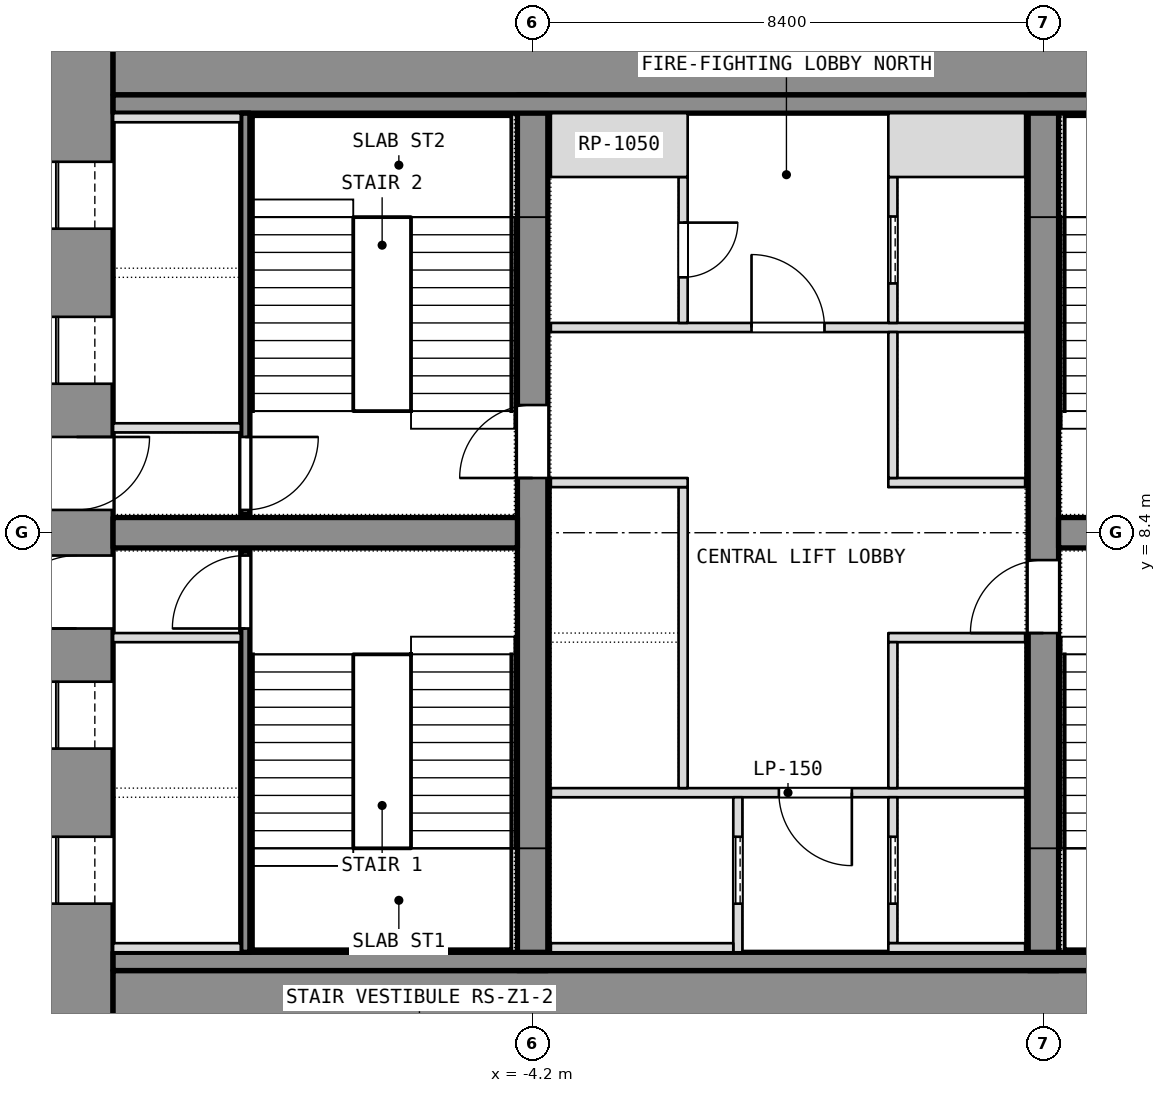
"""IFC4 building model, lengths in metres.
Left out: names, types, materials, properties, quantities, classifications, styles, units other than length and angle.
Written with IfcOpenShell. Run it as: python <this file> out.ifc"""

import sys

from ifc_helpers import new_model, si_unit, direction, frame, frame_2d, origin, place, context, subcontext, project, spatial, rectangle, extrude, element, fill, save


model = new_model("IFC4")
c1 = context("Model", 3, precision=1e-05, world=origin(), true_north=direction((0.0, 1.0)))
c2 = subcontext(c1, "Body", "Model", "MODEL_VIEW")
j1 = project(units=[si_unit("LENGTHUNIT", "METRE"), si_unit("PLANEANGLEUNIT", "RADIAN")], contexts=[c1])
p1 = place(None, origin())
s1 = spatial("IfcSite", under=j1, at=p1, CompositionType="ELEMENT")
p2 = place(p1, origin())
s2 = spatial("IfcBuilding", under=s1, at=p2, CompositionType="ELEMENT")
p3 = place(p2, frame((0.0, 0.0, 50.9)))
s3 = spatial("IfcBuildingStorey", under=s2, at=p3, CompositionType="ELEMENT", Elevation=50.9)
p4 = place(p3, frame((-11.7, 0.0, 0.0), z_axis=(0.0, 0.0, 1.0), x_axis=(0.0, 1.0, 0.0)))
e1 = element("IfcWall", 1, at=p4, inside=s3, PredefinedType="SHEAR", context=c2, shape_type="SweptSolid", body=[
    extrude(rectangle(XDim=16.8, YDim=1.2, at=frame_2d((8.4, 0.0))), origin(), (0.0, 0.0, 1.0), 3.6),
])
p5 = place(p4, frame((2.3, 0.0, 0.0)))
e2 = element("IfcOpeningElement", 2, at=p5, cuts=e1, PredefinedType="OPENING", context=c2, shape_type="SweptSolid", body=[
    extrude(rectangle(XDim=1.1, YDim=2.1, at=frame_2d((0.55, 1.05))), frame((0.0, 0.6, 0.0), z_axis=(0.0, -1.0, 0.0), x_axis=(1.0, 0.0, 0.0)), (0.0, 0.0, 1.0), 1.2),
])
p6 = place(p4, frame((4.85, 0.0, 0.0)))
e3 = element("IfcOpeningElement", 3, at=p6, cuts=e1, PredefinedType="OPENING", context=c2, shape_type="SweptSolid", body=[
    extrude(rectangle(XDim=1.1, YDim=2.1, at=frame_2d((0.55, 1.05))), frame((0.0, 0.6, 0.0), z_axis=(0.0, -1.0, 0.0), x_axis=(1.0, 0.0, 0.0)), (0.0, 0.0, 1.0), 1.2),
])
p7 = place(p4, frame((6.825, 0.0, 0.0)))
e4 = element("IfcOpeningElement", 4, at=p7, cuts=e1, PredefinedType="OPENING", context=c2, shape_type="SweptSolid", body=[
    extrude(rectangle(XDim=1.2, YDim=2.1, at=frame_2d((0.6, 1.05))), frame((0.0, 0.6, 0.0), z_axis=(0.0, -1.0, 0.0), x_axis=(1.0, 0.0, 0.0)), (0.0, 0.0, 1.0), 1.2),
])
p8 = place(p4, frame((13.4, 0.0, 0.0)))
e5 = element("IfcOpeningElement", 5, at=p8, cuts=e1, PredefinedType="OPENING", context=c2, shape_type="SweptSolid", body=[
    extrude(rectangle(XDim=1.1, YDim=2.1, at=frame_2d((0.55, 1.05))), frame((0.0, 0.6, 0.0), z_axis=(0.0, -1.0, 0.0), x_axis=(1.0, 0.0, 0.0)), (0.0, 0.0, 1.0), 1.2),
])
p9 = place(p4, frame((10.85, 0.0, 0.0)))
e6 = element("IfcOpeningElement", 6, at=p9, cuts=e1, PredefinedType="OPENING", context=c2, shape_type="SweptSolid", body=[
    extrude(rectangle(XDim=1.1, YDim=2.1, at=frame_2d((0.55, 1.05))), frame((0.0, 0.6, 0.0), z_axis=(0.0, -1.0, 0.0), x_axis=(1.0, 0.0, 0.0)), (0.0, 0.0, 1.0), 1.2),
])
p10 = place(p4, frame((8.775, 0.0, 0.0)))
e7 = element("IfcOpeningElement", 7, at=p10, cuts=e1, PredefinedType="OPENING", context=c2, shape_type="SweptSolid", body=[
    extrude(rectangle(XDim=1.2, YDim=2.1, at=frame_2d((0.6, 1.05))), frame((0.0, 0.6, 0.0), z_axis=(0.0, -1.0, 0.0), x_axis=(1.0, 0.0, 0.0)), (0.0, 0.0, 1.0), 1.2),
])
for number, where, z_axis, x_axis in (
    (8, (-11.1, 0.6, 0.0), (0.0, 0.0, 1.0), (1.0, 0.0, 0.0)),
    (9, (-11.1, 16.2, 0.0), (0.0, 0.0, 1.0), (1.0, 0.0, 0.0)),
):
    element("IfcWall", number, at=place(p3, frame(where, z_axis=z_axis, x_axis=x_axis)), inside=s3, PredefinedType="SHEAR", context=c2, shape_type="SweptSolid", body=[
        extrude(rectangle(XDim=22.2, YDim=1.2, at=frame_2d((11.1, 0.0))), origin(), (0.0, 0.0, 1.0), 3.6),
    ])
p11 = place(p3, frame((-4.2, 1.2, 0.0), z_axis=(0.0, 0.0, 1.0), x_axis=(0.0, 1.0, 0.0)))
e10 = element("IfcWall", 10, at=p11, inside=s3, PredefinedType="SHEAR", context=c2, shape_type="SweptSolid", body=[
    extrude(rectangle(XDim=14.4, YDim=0.5, at=frame_2d((7.2, 0.0))), origin(), (0.0, 0.0, 1.0), 3.6),
])
p12 = place(p11, frame((8.1, 0.0, 0.0)))
e11 = element("IfcOpeningElement", 11, at=p12, cuts=e10, PredefinedType="OPENING", context=c2, shape_type="SweptSolid", body=[
    extrude(rectangle(XDim=1.2, YDim=2.1, at=frame_2d((0.6, 1.05))), frame((0.0, 0.25, 0.0), z_axis=(0.0, -1.0, 0.0), x_axis=(1.0, 0.0, 0.0)), (0.0, 0.0, 1.0), 0.5),
])
p13 = place(p3, frame((4.2, 1.2, 0.0), z_axis=(0.0, 0.0, 1.0), x_axis=(0.0, 1.0, 0.0)))
e12 = element("IfcWall", 12, at=p13, inside=s3, PredefinedType="SHEAR", context=c2, shape_type="SweptSolid", body=[
    extrude(rectangle(XDim=14.4, YDim=0.5, at=frame_2d((7.2, 0.0))), origin(), (0.0, 0.0, 1.0), 3.6),
])
p14 = place(p13, frame((5.55, 0.0, 0.0)))
e13 = element("IfcOpeningElement", 13, at=p14, cuts=e12, PredefinedType="OPENING", context=c2, shape_type="SweptSolid", body=[
    extrude(rectangle(XDim=1.2, YDim=2.1, at=frame_2d((0.6, 1.05))), frame((0.0, 0.25, 0.0), z_axis=(0.0, -1.0, 0.0), x_axis=(1.0, 0.0, 0.0)), (0.0, 0.0, 1.0), 0.5),
])
for number, where, z_axis, x_axis in (
    (14, (-11.1, 8.4, 0.0), (0.0, 0.0, 1.0), (1.0, 0.0, 0.0)),
    (15, (4.45, 8.4, 0.0), (0.0, 0.0, 1.0), (1.0, 0.0, 0.0)),
):
    element("IfcWall", number, at=place(p3, frame(where, z_axis=z_axis, x_axis=x_axis)), inside=s3, PredefinedType="SHEAR", context=c2, shape_type="SweptSolid", body=[
        extrude(rectangle(XDim=6.65, YDim=0.5, at=frame_2d((3.325, 0.0))), origin(), (0.0, 0.0, 1.0), 3.6),
    ])
for number, where, z_axis, x_axis in (
    (16, (-11.1, 1.35, 0.0), (0.0, 0.0, 1.0), (1.0, 0.0, 0.0)),
    (17, (-11.1, 15.45, 0.0), (0.0, 0.0, 1.0), (1.0, 0.0, 0.0)),
):
    element("IfcWall", number, at=place(p3, frame(where, z_axis=z_axis, x_axis=x_axis)), inside=s3, PredefinedType="PARTITIONING", context=c2, shape_type="SweptSolid", body=[
        extrude(rectangle(XDim=22.2, YDim=0.3, at=frame_2d((11.1, 0.0))), origin(), (0.0, 0.0, 1.0), 3.34),
    ])
p15 = place(p3, frame((-8.925, 1.5, 0.0), z_axis=(0.0, 0.0, 1.0), x_axis=(0.0, 1.0, 0.0)))
e18 = element("IfcWall", 18, at=p15, inside=s3, PredefinedType="SHEAR", context=c2, shape_type="SweptSolid", body=[
    extrude(rectangle(XDim=6.6, YDim=0.15, at=frame_2d((3.3, 0.0))), origin(), (0.0, 0.0, 1.0), 3.34),
])
p16 = place(p15, frame((5.325, 0.0, 0.0)))
e19 = element("IfcOpeningElement", 19, at=p16, cuts=e18, PredefinedType="OPENING", context=c2, shape_type="SweptSolid", body=[
    extrude(rectangle(XDim=1.2, YDim=2.1, at=frame_2d((0.6, 1.05))), frame((0.0, 0.075, 0.0), z_axis=(0.0, -1.0, 0.0), x_axis=(1.0, 0.0, 0.0)), (0.0, 0.0, 1.0), 0.15),
])
for number, where, z_axis, x_axis in (
    (20, (-11.1, 6.675, 0.0), (0.0, 0.0, 1.0), (1.0, 0.0, 0.0)),
    (21, (-11.1, 1.575, 0.0), (0.0, 0.0, 1.0), (1.0, 0.0, 0.0)),
):
    element("IfcWall", number, at=place(p3, frame(where, z_axis=z_axis, x_axis=x_axis)), inside=s3, PredefinedType="SHEAR", context=c2, shape_type="SweptSolid", body=[
        extrude(rectangle(XDim=2.1, YDim=0.15, at=frame_2d((1.05, 0.0))), origin(), (0.0, 0.0, 1.0), 3.6),
    ])
p17 = place(p3, frame((-8.925, 8.7, 0.0), z_axis=(0.0, 0.0, 1.0), x_axis=(0.0, 1.0, 0.0)))
e22 = element("IfcWall", 22, at=p17, inside=s3, PredefinedType="SHEAR", context=c2, shape_type="SweptSolid", body=[
    extrude(rectangle(XDim=6.6, YDim=0.15, at=frame_2d((3.3, 0.0))), origin(), (0.0, 0.0, 1.0), 3.34),
])
p18 = place(p17, frame((0.075, 0.0, 0.0)))
e23 = element("IfcOpeningElement", 23, at=p18, cuts=e22, PredefinedType="OPENING", context=c2, shape_type="SweptSolid", body=[
    extrude(rectangle(XDim=1.2, YDim=2.1, at=frame_2d((0.6, 1.05))), frame((0.0, 0.075, 0.0), z_axis=(0.0, -1.0, 0.0), x_axis=(1.0, 0.0, 0.0)), (0.0, 0.0, 1.0), 0.15),
])
for number, where, z_axis, x_axis in (
    (24, (-11.1, 10.125, 0.0), (0.0, 0.0, 1.0), (1.0, 0.0, 0.0)),
    (25, (-11.1, 15.225, 0.0), (0.0, 0.0, 1.0), (1.0, 0.0, 0.0)),
):
    element("IfcWall", number, at=place(p3, frame(where, z_axis=z_axis, x_axis=x_axis)), inside=s3, PredefinedType="SHEAR", context=c2, shape_type="SweptSolid", body=[
        extrude(rectangle(XDim=2.1, YDim=0.15, at=frame_2d((1.05, 0.0))), origin(), (0.0, 0.0, 1.0), 3.6),
    ])
p19 = place(p3, frame((-3.9, 4.125, 0.0), z_axis=(0.0, 0.0, 1.0), x_axis=(1.0, 0.0, 0.0)))
e26 = element("IfcWall", 26, at=p19, inside=s3, PredefinedType="PARTITIONING", context=c2, shape_type="SweptSolid", body=[
    extrude(rectangle(XDim=7.8, YDim=0.15, at=frame_2d((3.9, 0.0))), origin(), (0.0, 0.0, 1.0), 3.34),
])
p20 = place(p19, frame((3.75, 0.0, 0.0)))
e27 = element("IfcOpeningElement", 27, at=p20, cuts=e26, PredefinedType="OPENING", context=c2, shape_type="SweptSolid", body=[
    extrude(rectangle(XDim=1.2, YDim=2.1, at=frame_2d((0.6, 1.05))), frame((0.0, 0.075, 0.0), z_axis=(0.0, -1.0, 0.0), x_axis=(1.0, 0.0, 0.0)), (0.0, 0.0, 1.0), 0.15),
])
p21 = place(p3, frame((-3.9, 11.775, 0.0), z_axis=(0.0, 0.0, 1.0), x_axis=(1.0, 0.0, 0.0)))
e28 = element("IfcWall", 28, at=p21, inside=s3, PredefinedType="PARTITIONING", context=c2, shape_type="SweptSolid", body=[
    extrude(rectangle(XDim=7.8, YDim=0.15, at=frame_2d((3.9, 0.0))), origin(), (0.0, 0.0, 1.0), 3.34),
])
p22 = place(p21, frame((3.3, 0.0, 0.0)))
e29 = element("IfcOpeningElement", 29, at=p22, cuts=e28, PredefinedType="OPENING", context=c2, shape_type="SweptSolid", body=[
    extrude(rectangle(XDim=1.2, YDim=2.1, at=frame_2d((0.6, 1.05))), frame((0.0, 0.075, 0.0), z_axis=(0.0, -1.0, 0.0), x_axis=(1.0, 0.0, 0.0)), (0.0, 0.0, 1.0), 0.15),
])
p23 = place(p3, frame((-0.825, 1.5, 0.0), z_axis=(0.0, 0.0, 1.0), x_axis=(0.0, 1.0, 0.0)))
e30 = element("IfcWall", 30, at=p23, inside=s3, PredefinedType="SHEAR", context=c2, shape_type="SweptSolid", body=[
    extrude(rectangle(XDim=2.55, YDim=0.15, at=frame_2d((1.275, 0.0))), origin(), (0.0, 0.0, 1.0), 3.6),
])
p24 = place(p23, frame((0.8, 0.0, 0.0)))
e31 = element("IfcOpeningElement", 31, at=p24, cuts=e30, PredefinedType="OPENING", context=c2, shape_type="SweptSolid", body=[
    extrude(rectangle(XDim=1.1, YDim=2.1, at=frame_2d((0.55, 1.05))), frame((0.0, 0.075, 0.0), z_axis=(0.0, -1.0, 0.0), x_axis=(1.0, 0.0, 0.0)), (0.0, 0.0, 1.0), 0.15),
])
p25 = place(p3, frame((-3.9, 1.575, 0.0), z_axis=(0.0, 0.0, 1.0), x_axis=(1.0, 0.0, 0.0)))
e32 = element("IfcWall", 32, at=p25, inside=s3, PredefinedType="SHEAR", context=c2, shape_type="SweptSolid", body=[
    extrude(rectangle(XDim=3.0, YDim=0.15, at=frame_2d((1.5, 0.0))), origin(), (0.0, 0.0, 1.0), 3.6),
])
p26 = place(p3, frame((-1.725, 4.2, 0.0), z_axis=(0.0, 0.0, 1.0), x_axis=(0.0, 1.0, 0.0)))
e33 = element("IfcWall", 33, at=p26, inside=s3, PredefinedType="SHEAR", context=c2, shape_type="SweptSolid", body=[
    extrude(rectangle(XDim=4.95, YDim=0.15, at=frame_2d((2.475, 0.0))), origin(), (0.0, 0.0, 1.0), 3.6),
])
p27 = place(p3, frame((-3.9, 9.225, 0.0), z_axis=(0.0, 0.0, 1.0), x_axis=(1.0, 0.0, 0.0)))
e34 = element("IfcWall", 34, at=p27, inside=s3, PredefinedType="SHEAR", context=c2, shape_type="SweptSolid", body=[
    extrude(rectangle(XDim=2.25, YDim=0.15, at=frame_2d((1.125, 0.0))), origin(), (0.0, 0.0, 1.0), 3.6),
])
p28 = place(p3, frame((-1.725, 11.85, 0.0), z_axis=(0.0, 0.0, 1.0), x_axis=(0.0, 1.0, 0.0)))
e35 = element("IfcWall", 35, at=p28, inside=s3, PredefinedType="PARTITIONING", context=c2, shape_type="SweptSolid", body=[
    extrude(rectangle(XDim=2.4, YDim=0.15, at=frame_2d((1.2, 0.0))), origin(), (0.0, 0.0, 1.0), 3.34),
])
p29 = place(p28, frame((0.75, 0.0, 0.0)))
e36 = element("IfcOpeningElement", 36, at=p29, cuts=e35, PredefinedType="OPENING", context=c2, shape_type="SweptSolid", body=[
    extrude(rectangle(XDim=0.9, YDim=2.1, at=frame_2d((0.45, 1.05))), frame((0.0, 0.075, 0.0), z_axis=(0.0, -1.0, 0.0), x_axis=(1.0, 0.0, 0.0)), (0.0, 0.0, 1.0), 0.15),
])
p30 = place(p3, frame((-3.9, 14.775, 0.0), z_axis=(0.0, 0.0, 1.0), x_axis=(1.0, 0.0, 0.0)))
e37 = element("IfcWall", 37, at=p30, inside=s3, PredefinedType="PARTITIONING", context=c2, shape_type="SweptSolid", body=[
    extrude(rectangle(XDim=2.25, YDim=1.05, at=frame_2d((1.125, 0.0))), origin(), (0.0, 0.0, 1.0), 3.34),
])
p31 = place(p3, frame((1.725, 1.65, 0.0), z_axis=(0.0, 0.0, 1.0), x_axis=(0.0, 1.0, 0.0)))
e38 = element("IfcWall", 38, at=p31, inside=s3, PredefinedType="SHEAR", context=c2, shape_type="SweptSolid", body=[
    extrude(rectangle(XDim=2.4, YDim=0.15, at=frame_2d((1.2, 0.0))), origin(), (0.0, 0.0, 1.0), 3.6),
])
p32 = place(p31, frame((0.65, 0.0, 0.0)))
e39 = element("IfcOpeningElement", 39, at=p32, cuts=e38, PredefinedType="OPENING", context=c2, shape_type="SweptSolid", body=[
    extrude(rectangle(XDim=1.1, YDim=2.1, at=frame_2d((0.55, 1.05))), frame((0.0, 0.075, 0.0), z_axis=(0.0, -1.0, 0.0), x_axis=(1.0, 0.0, 0.0)), (0.0, 0.0, 1.0), 0.15),
])
p33 = place(p3, frame((1.65, 1.575, 0.0), z_axis=(0.0, 0.0, 1.0), x_axis=(1.0, 0.0, 0.0)))
e40 = element("IfcWall", 40, at=p33, inside=s3, PredefinedType="SHEAR", context=c2, shape_type="SweptSolid", body=[
    extrude(rectangle(XDim=2.25, YDim=0.15, at=frame_2d((1.125, 0.0))), origin(), (0.0, 0.0, 1.0), 3.6),
])
p34 = place(p3, frame((1.725, 11.85, 0.0), z_axis=(0.0, 0.0, 1.0), x_axis=(0.0, 1.0, 0.0)))
e41 = element("IfcWall", 41, at=p34, inside=s3, PredefinedType="SHEAR", context=c2, shape_type="SweptSolid", body=[
    extrude(rectangle(XDim=2.4, YDim=0.15, at=frame_2d((1.2, 0.0))), origin(), (0.0, 0.0, 1.0), 3.6),
])
p35 = place(p34, frame((0.65, 0.0, 0.0)))
e42 = element("IfcOpeningElement", 42, at=p35, cuts=e41, PredefinedType="OPENING", context=c2, shape_type="SweptSolid", body=[
    extrude(rectangle(XDim=1.1, YDim=2.1, at=frame_2d((0.55, 1.05))), frame((0.0, 0.075, 0.0), z_axis=(0.0, -1.0, 0.0), x_axis=(1.0, 0.0, 0.0)), (0.0, 0.0, 1.0), 0.15),
])
p36 = place(p3, frame((1.65, 14.775, 0.0), z_axis=(0.0, 0.0, 1.0), x_axis=(1.0, 0.0, 0.0)))
e43 = element("IfcWall", 43, at=p36, inside=s3, PredefinedType="SHEAR", context=c2, shape_type="SweptSolid", body=[
    extrude(rectangle(XDim=2.25, YDim=1.05, at=frame_2d((1.125, 0.0))), origin(), (0.0, 0.0, 1.0), 3.6),
])
for number, where, z_axis, x_axis in (
    (44, (1.65, 6.675, 0.0), (0.0, 0.0, 1.0), (1.0, 0.0, 0.0)),
    (45, (1.65, 9.225, 0.0), (0.0, 0.0, 1.0), (1.0, 0.0, 0.0)),
):
    element("IfcWall", number, at=place(p3, frame(where, z_axis=z_axis, x_axis=x_axis)), inside=s3, PredefinedType="SHEAR", context=c2, shape_type="SweptSolid", body=[
        extrude(rectangle(XDim=2.25, YDim=0.15, at=frame_2d((1.125, 0.0))), origin(), (0.0, 0.0, 1.0), 3.6),
    ])
p37 = place(p3, frame((1.725, 4.2, 0.0), z_axis=(0.0, 0.0, 1.0), x_axis=(0.0, 1.0, 0.0)))
e46 = element("IfcWall", 46, at=p37, inside=s3, PredefinedType="SHEAR", context=c2, shape_type="SweptSolid", body=[
    extrude(rectangle(XDim=2.4, YDim=0.15, at=frame_2d((1.2, 0.0))), origin(), (0.0, 0.0, 1.0), 3.6),
])
p38 = place(p3, frame((1.725, 9.3, 0.0), z_axis=(0.0, 0.0, 1.0), x_axis=(0.0, 1.0, 0.0)))
e47 = element("IfcWall", 47, at=p38, inside=s3, PredefinedType="SHEAR", context=c2, shape_type="SweptSolid", body=[
    extrude(rectangle(XDim=2.4, YDim=0.15, at=frame_2d((1.2, 0.0))), origin(), (0.0, 0.0, 1.0), 3.6),
])
p39 = place(p5, origin())
e48 = element("IfcDoor", 48, at=p39, inside=s3, OperationType="SLIDING_TO_LEFT", PredefinedType="DOOR", context=c2, shape_type="SweptSolid", body=[
    extrude(rectangle(XDim=1.1, YDim=2.1, at=frame_2d((0.55, 1.05))), frame((0.0, 0.025, 0.0), z_axis=(0.0, -1.0, 0.0), x_axis=(1.0, 0.0, 0.0)), (0.0, 0.0, 1.0), 0.05),
])
fill(e2, e48)
p40 = place(p6, origin())
e49 = element("IfcDoor", 49, at=p40, inside=s3, OperationType="SLIDING_TO_LEFT", PredefinedType="DOOR", context=c2, shape_type="SweptSolid", body=[
    extrude(rectangle(XDim=1.1, YDim=2.1, at=frame_2d((0.55, 1.05))), frame((0.0, 0.025, 0.0), z_axis=(0.0, -1.0, 0.0), x_axis=(1.0, 0.0, 0.0)), (0.0, 0.0, 1.0), 0.05),
])
fill(e3, e49)
p41 = place(p7, origin())
e50 = element("IfcDoor", 50, at=p41, inside=s3, OperationType="SINGLE_SWING_LEFT", PredefinedType="DOOR", context=c2, shape_type="SweptSolid", body=[
    extrude(rectangle(XDim=1.2, YDim=2.1, at=frame_2d((0.6, 1.05))), frame((0.0, 0.025, 0.0), z_axis=(0.0, -1.0, 0.0), x_axis=(1.0, 0.0, 0.0)), (0.0, 0.0, 1.0), 0.05),
])
fill(e4, e50)
p42 = place(p16, origin())
e51 = element("IfcDoor", 51, at=p42, inside=s3, OperationType="SINGLE_SWING_LEFT", PredefinedType="DOOR", context=c2, shape_type="SweptSolid", body=[
    extrude(rectangle(XDim=1.2, YDim=2.1, at=frame_2d((0.6, 1.05))), frame((0.0, 0.025, 0.0), z_axis=(0.0, -1.0, 0.0), x_axis=(1.0, 0.0, 0.0)), (0.0, 0.0, 1.0), 0.05),
])
fill(e19, e51)
p43 = place(p8, origin())
e52 = element("IfcDoor", 52, at=p43, inside=s3, OperationType="SLIDING_TO_LEFT", PredefinedType="DOOR", context=c2, shape_type="SweptSolid", body=[
    extrude(rectangle(XDim=1.1, YDim=2.1, at=frame_2d((0.55, 1.05))), frame((0.0, 0.025, 0.0), z_axis=(0.0, -1.0, 0.0), x_axis=(1.0, 0.0, 0.0)), (0.0, 0.0, 1.0), 0.05),
])
fill(e5, e52)
p44 = place(p9, origin())
e53 = element("IfcDoor", 53, at=p44, inside=s3, OperationType="SLIDING_TO_LEFT", PredefinedType="DOOR", context=c2, shape_type="SweptSolid", body=[
    extrude(rectangle(XDim=1.1, YDim=2.1, at=frame_2d((0.55, 1.05))), frame((0.0, 0.025, 0.0), z_axis=(0.0, -1.0, 0.0), x_axis=(1.0, 0.0, 0.0)), (0.0, 0.0, 1.0), 0.05),
])
fill(e6, e53)
p45 = place(p10, origin())
e54 = element("IfcDoor", 54, at=p45, inside=s3, OperationType="SINGLE_SWING_LEFT", PredefinedType="DOOR", context=c2, shape_type="SweptSolid", body=[
    extrude(rectangle(XDim=1.2, YDim=2.1, at=frame_2d((0.6, 1.05))), frame((0.0, 0.025, 0.0), z_axis=(0.0, -1.0, 0.0), x_axis=(1.0, 0.0, 0.0)), (0.0, 0.0, 1.0), 0.05),
])
fill(e7, e54)
p46 = place(p18, origin())
e55 = element("IfcDoor", 55, at=p46, inside=s3, OperationType="SINGLE_SWING_LEFT", PredefinedType="DOOR", context=c2, shape_type="SweptSolid", body=[
    extrude(rectangle(XDim=1.2, YDim=2.1, at=frame_2d((0.6, 1.05))), frame((0.0, 0.025, 0.0), z_axis=(0.0, -1.0, 0.0), x_axis=(1.0, 0.0, 0.0)), (0.0, 0.0, 1.0), 0.05),
])
fill(e23, e55)
p47 = place(p24, origin())
e56 = element("IfcDoor", 56, at=p47, inside=s3, OperationType="SLIDING_TO_LEFT", PredefinedType="DOOR", context=c2, shape_type="SweptSolid", body=[
    extrude(rectangle(XDim=1.1, YDim=2.1, at=frame_2d((0.55, 1.05))), frame((0.0, 0.025, 0.0), z_axis=(0.0, -1.0, 0.0), x_axis=(1.0, 0.0, 0.0)), (0.0, 0.0, 1.0), 0.05),
])
fill(e31, e56)
p48 = place(p32, origin())
e57 = element("IfcDoor", 57, at=p48, inside=s3, OperationType="SLIDING_TO_LEFT", PredefinedType="DOOR", context=c2, shape_type="SweptSolid", body=[
    extrude(rectangle(XDim=1.1, YDim=2.1, at=frame_2d((0.55, 1.05))), frame((0.0, 0.025, 0.0), z_axis=(0.0, -1.0, 0.0), x_axis=(1.0, 0.0, 0.0)), (0.0, 0.0, 1.0), 0.05),
])
fill(e39, e57)
p49 = place(p35, origin())
e58 = element("IfcDoor", 58, at=p49, inside=s3, OperationType="SLIDING_TO_LEFT", PredefinedType="DOOR", context=c2, shape_type="SweptSolid", body=[
    extrude(rectangle(XDim=1.1, YDim=2.1, at=frame_2d((0.55, 1.05))), frame((0.0, 0.025, 0.0), z_axis=(0.0, -1.0, 0.0), x_axis=(1.0, 0.0, 0.0)), (0.0, 0.0, 1.0), 0.05),
])
fill(e42, e58)
p50 = place(p20, origin())
e59 = element("IfcDoor", 59, at=p50, inside=s3, OperationType="SINGLE_SWING_LEFT", PredefinedType="DOOR", context=c2, shape_type="SweptSolid", body=[
    extrude(rectangle(XDim=1.2, YDim=2.1, at=frame_2d((0.6, 1.05))), frame((0.0, 0.025, 0.0), z_axis=(0.0, -1.0, 0.0), x_axis=(1.0, 0.0, 0.0)), (0.0, 0.0, 1.0), 0.05),
])
fill(e27, e59)
p51 = place(p22, origin())
e60 = element("IfcDoor", 60, at=p51, inside=s3, OperationType="SINGLE_SWING_LEFT", PredefinedType="DOOR", context=c2, shape_type="SweptSolid", body=[
    extrude(rectangle(XDim=1.2, YDim=2.1, at=frame_2d((0.6, 1.05))), frame((0.0, 0.025, 0.0), z_axis=(0.0, -1.0, 0.0), x_axis=(1.0, 0.0, 0.0)), (0.0, 0.0, 1.0), 0.05),
])
fill(e29, e60)
p52 = place(p29, origin())
e61 = element("IfcDoor", 61, at=p52, inside=s3, OperationType="SINGLE_SWING_LEFT", PredefinedType="DOOR", context=c2, shape_type="SweptSolid", body=[
    extrude(rectangle(XDim=0.9, YDim=2.1, at=frame_2d((0.45, 1.05))), frame((0.0, 0.025, 0.0), z_axis=(0.0, -1.0, 0.0), x_axis=(1.0, 0.0, 0.0)), (0.0, 0.0, 1.0), 0.05),
])
fill(e36, e61)
p53 = place(p12, origin())
e62 = element("IfcDoor", 62, at=p53, inside=s3, OperationType="SINGLE_SWING_LEFT", PredefinedType="DOOR", context=c2, shape_type="SweptSolid", body=[
    extrude(rectangle(XDim=1.2, YDim=2.1, at=frame_2d((0.6, 1.05))), frame((0.0, 0.025, 0.0), z_axis=(0.0, -1.0, 0.0), x_axis=(1.0, 0.0, 0.0)), (0.0, 0.0, 1.0), 0.05),
])
fill(e11, e62)
p54 = place(p14, origin())
e63 = element("IfcDoor", 63, at=p54, inside=s3, OperationType="SINGLE_SWING_LEFT", PredefinedType="DOOR", context=c2, shape_type="SweptSolid", body=[
    extrude(rectangle(XDim=1.2, YDim=2.1, at=frame_2d((0.6, 1.05))), frame((0.0, 0.025, 0.0), z_axis=(0.0, -1.0, 0.0), x_axis=(1.0, 0.0, 0.0)), (0.0, 0.0, 1.0), 0.05),
])
fill(e13, e63)
save(model, sys.argv[1])
